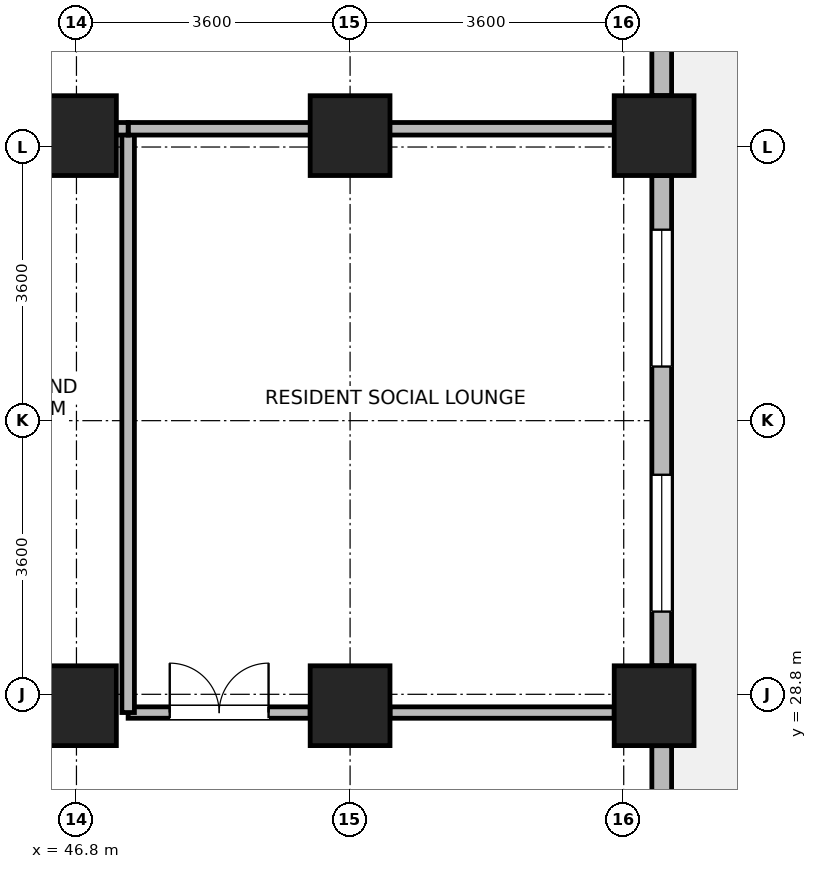
"""IFC4 building model, lengths in metres.
Left out: names, types, materials, properties, quantities, classifications, styles, units other than length and angle.
Written with IfcOpenShell. Run it as: python <this file> out.ifc"""

import sys

from ifc_helpers import new_model, si_unit, direction, frame, frame_2d, origin, origin_2d, place, context, subcontext, project, spatial, rectangle, extrude, source, transform, mapped, element, fill, save


model = new_model("IFC4")
c1 = context("Model", 3, precision=1e-05, world=origin(), true_north=direction((0.0, 1.0)))
c2 = subcontext(c1, "Body", "Model", "MODEL_VIEW")
j1 = project(units=[si_unit("LENGTHUNIT", "METRE"), si_unit("PLANEANGLEUNIT", "RADIAN")], contexts=[c1])
p1 = place(None, origin())
s1 = spatial("IfcSite", under=j1, at=p1, CompositionType="ELEMENT")
p2 = place(p1, origin())
s2 = spatial("IfcBuilding", under=s1, at=p2, CompositionType="ELEMENT")
p3 = place(p2, frame((0.0, 0.0, 188.3)))
s3 = spatial("IfcBuildingStorey", under=s2, at=p3, CompositionType="ELEMENT", Elevation=188.3)
m1 = source(origin(), c2, "Body", "SweptSolid", [
    extrude(rectangle(XDim=1.05, YDim=1.05, at=origin_2d()), origin(), (0.0, 0.0, 1.0), 3.7),
])
for number, where, z_axis, x_axis in (
    (1, (46.8, 28.65, 0.0), (0.0, 0.0, 1.0), (1.0, 0.0, 0.0)),
    (2, (46.8, 36.15, 0.0), (0.0, 0.0, 1.0), (1.0, 0.0, 0.0)),
    (3, (50.4, 28.65, 0.0), (0.0, 0.0, 1.0), (1.0, 0.0, 0.0)),
    (4, (50.4, 36.15, 0.0), (0.0, 0.0, 1.0), (1.0, 0.0, 0.0)),
    (5, (54.4, 28.65, 0.0), (0.0, 0.0, 1.0), (1.0, 0.0, 0.0)),
    (6, (54.4, 36.15, 0.0), (0.0, 0.0, 1.0), (1.0, 0.0, 0.0)),
):
    element("IfcColumn", number, at=place(p3, frame(where, z_axis=z_axis, x_axis=x_axis)), inside=s3, PredefinedType="COLUMN", context=c2, shape_type="MappedRepresentation", body=[
        mapped(m1, transform((0.0, 0.0, 0.0), x_axis=(1.0, 0.0, 0.0), y_axis=(0.0, 1.0, 0.0), z_axis=(0.0, 0.0, 1.0), scale=1.0)),
    ])
p4 = place(p3, frame((54.5, 28.124, 0.0), z_axis=(0.0, 0.0, 1.0), x_axis=(0.0, -1.0, 0.0)))
e7 = element("IfcWall", 7, at=p4, inside=s3, PredefinedType="STANDARD", context=c2, shape_type="SweptSolid", body=[
    extrude(rectangle(XDim=5.998, YDim=0.26, at=frame_2d((2.999, 0.0))), origin(), (0.0, 0.0, 1.0), 2.87),
])
p5 = place(p4, frame((3.598, 0.0, 0.85)))
e8 = element("IfcOpeningElement", 8, at=p5, cuts=e7, PredefinedType="OPENING", context=c2, shape_type="SweptSolid", body=[
    extrude(rectangle(XDim=1.8, YDim=1.85, at=frame_2d((0.9, 0.925))), frame((0.0, 0.14, 0.0), z_axis=(0.0, -1.0, 0.0), x_axis=(1.0, 0.0, 0.0)), (0.0, 0.0, 1.0), 0.28),
])
p6 = place(p4, frame((2.044, 0.0, 0.85)))
e9 = element("IfcOpeningElement", 9, at=p6, cuts=e7, PredefinedType="OPENING", context=c2, shape_type="SweptSolid", body=[
    extrude(rectangle(XDim=0.95, YDim=1.75, at=frame_2d((0.475, 0.875))), frame((0.0, 0.14, 0.0), z_axis=(0.0, -1.0, 0.0), x_axis=(1.0, 0.0, 0.0)), (0.0, 0.0, 1.0), 0.28),
])
p7 = place(p3, frame((54.5, 35.624, 0.0), z_axis=(0.0, 0.0, 1.0), x_axis=(0.0, -1.0, 0.0)))
e10 = element("IfcWall", 10, at=p7, inside=s3, PredefinedType="STANDARD", context=c2, shape_type="SweptSolid", body=[
    extrude(rectangle(XDim=6.448, YDim=0.26, at=frame_2d((3.224, 0.0))), origin(), (0.0, 0.0, 1.0), 2.87),
])
p8 = place(p7, frame((0.712, 0.0, 0.85)))
e11 = element("IfcOpeningElement", 11, at=p8, cuts=e10, PredefinedType="OPENING", context=c2, shape_type="SweptSolid", body=[
    extrude(rectangle(XDim=1.8, YDim=1.85, at=frame_2d((0.9, 0.925))), frame((0.0, 0.14, 0.0), z_axis=(0.0, -1.0, 0.0), x_axis=(1.0, 0.0, 0.0)), (0.0, 0.0, 1.0), 0.28),
])
p9 = place(p7, frame((3.936, 0.0, 0.85)))
e12 = element("IfcOpeningElement", 12, at=p9, cuts=e10, PredefinedType="OPENING", context=c2, shape_type="SweptSolid", body=[
    extrude(rectangle(XDim=1.8, YDim=1.85, at=frame_2d((0.9, 0.925))), frame((0.0, 0.14, 0.0), z_axis=(0.0, -1.0, 0.0), x_axis=(1.0, 0.0, 0.0)), (0.0, 0.0, 1.0), 0.28),
])
p10 = place(p3, frame((54.5, 43.33, 0.0), z_axis=(0.0, 0.0, 1.0), x_axis=(0.0, -1.0, 0.0)))
e13 = element("IfcWall", 13, at=p10, inside=s3, PredefinedType="STANDARD", context=c2, shape_type="SweptSolid", body=[
    extrude(rectangle(XDim=6.654, YDim=0.26, at=frame_2d((3.327, 0.0))), origin(), (0.0, 0.0, 1.0), 3.32),
])
p11 = place(p10, frame((0.763, 0.0, 0.85)))
e14 = element("IfcOpeningElement", 14, at=p11, cuts=e13, PredefinedType="OPENING", context=c2, shape_type="SweptSolid", body=[
    extrude(rectangle(XDim=1.8, YDim=1.85, at=frame_2d((0.9, 0.925))), frame((0.0, 0.14, 0.0), z_axis=(0.0, -1.0, 0.0), x_axis=(1.0, 0.0, 0.0)), (0.0, 0.0, 1.0), 0.28),
])
p12 = place(p10, frame((4.091, 0.0, 0.85)))
e15 = element("IfcOpeningElement", 15, at=p12, cuts=e13, PredefinedType="OPENING", context=c2, shape_type="SweptSolid", body=[
    extrude(rectangle(XDim=1.8, YDim=1.85, at=frame_2d((0.9, 0.925))), frame((0.0, 0.14, 0.0), z_axis=(0.0, -1.0, 0.0), x_axis=(1.0, 0.0, 0.0)), (0.0, 0.0, 1.0), 0.28),
])
p13 = place(p3, frame((47.48, 28.56, 0.0), z_axis=(0.0, 0.0, 1.0), x_axis=(1.0, 0.0, 0.0)))
e16 = element("IfcWall", 16, at=p13, inside=s3, PredefinedType="PARTITIONING", context=c2, shape_type="SweptSolid", body=[
    extrude(rectangle(XDim=2.395, YDim=0.15, at=frame_2d((1.198, 0.0))), origin(), (0.0, 0.0, 1.0), 2.72),
])
p14 = place(p13, frame((0.548, 0.0, 0.0)))
e17 = element("IfcOpeningElement", 17, at=p14, cuts=e16, PredefinedType="OPENING", context=c2, shape_type="SweptSolid", body=[
    extrude(rectangle(XDim=1.3, YDim=2.12, at=frame_2d((0.65, 1.06))), frame((0.0, 0.085, 0.0), z_axis=(0.0, -1.0, 0.0), x_axis=(1.0, 0.0, 0.0)), (0.0, 0.0, 1.0), 0.17),
])
p15 = place(p3, frame((50.925, 28.56, 0.0), z_axis=(0.0, 0.0, 1.0), x_axis=(1.0, 0.0, 0.0)))
e18 = element("IfcWall", 18, at=p15, inside=s3, PredefinedType="PARTITIONING", context=c2, shape_type="SweptSolid", body=[
    extrude(rectangle(XDim=2.95, YDim=0.15, at=frame_2d((1.475, 0.0))), origin(), (0.0, 0.0, 1.0), 2.72),
])
p16 = place(p3, frame((47.48, 28.56, 0.0), z_axis=(0.0, 0.0, 1.0), x_axis=(0.0, 1.0, 0.0)))
e19 = element("IfcWall", 19, at=p16, inside=s3, PredefinedType="PARTITIONING", context=c2, shape_type="SweptSolid", body=[
    extrude(rectangle(XDim=7.68, YDim=0.165, at=frame_2d((3.84, 0.0))), origin(), (0.0, 0.0, 1.0), 3.32),
])
p17 = place(p3, frame((47.48, 36.24, 0.0), z_axis=(0.0, 0.0, 1.0), x_axis=(1.0, 0.0, 0.0)))
e20 = element("IfcWall", 20, at=p17, inside=s3, PredefinedType="PARTITIONING", context=c2, shape_type="SweptSolid", body=[
    extrude(rectangle(XDim=6.888, YDim=0.165, at=frame_2d((3.444, 0.0))), origin(), (0.0, 0.0, 1.0), 2.72),
])
p18 = place(p3, frame((43.8, 36.24, 0.0), z_axis=(0.0, 0.0, 1.0), x_axis=(1.0, 0.0, 0.0)))
e21 = element("IfcWall", 21, at=p18, inside=s3, PredefinedType="PARTITIONING", context=c2, shape_type="SweptSolid", body=[
    extrude(rectangle(XDim=3.68, YDim=0.165, at=frame_2d((1.84, 0.0))), origin(), (0.0, 0.0, 1.0), 2.72),
])
p19 = place(p8, origin())
e22 = element("IfcWindow", 22, at=p19, inside=s3, PartitioningType="SINGLE_PANEL", PredefinedType="WINDOW", context=c2, shape_type="SweptSolid", body=[
    extrude(rectangle(XDim=1.8, YDim=1.85, at=frame_2d((0.9, 0.925))), frame((0.0, 0.03, 0.0), z_axis=(0.0, -1.0, 0.0), x_axis=(1.0, 0.0, 0.0)), (0.0, 0.0, 1.0), 0.06),
])
fill(e11, e22)
p20 = place(p9, origin())
e23 = element("IfcWindow", 23, at=p20, inside=s3, PartitioningType="SINGLE_PANEL", PredefinedType="WINDOW", context=c2, shape_type="SweptSolid", body=[
    extrude(rectangle(XDim=1.8, YDim=1.85, at=frame_2d((0.9, 0.925))), frame((0.0, 0.03, 0.0), z_axis=(0.0, -1.0, 0.0), x_axis=(1.0, 0.0, 0.0)), (0.0, 0.0, 1.0), 0.06),
])
fill(e12, e23)
p21 = place(p14, origin())
e24 = element("IfcDoor", 24, at=p21, inside=s3, OperationType="DOUBLE_DOOR_SINGLE_SWING", PredefinedType="DOOR", context=c2, shape_type="SweptSolid", body=[
    extrude(rectangle(XDim=1.3, YDim=2.12, at=frame_2d((0.65, 1.06))), frame((0.0, 0.025, 0.0), z_axis=(0.0, -1.0, 0.0), x_axis=(1.0, 0.0, 0.0)), (0.0, 0.0, 1.0), 0.05),
])
fill(e17, e24)
save(model, sys.argv[1])
